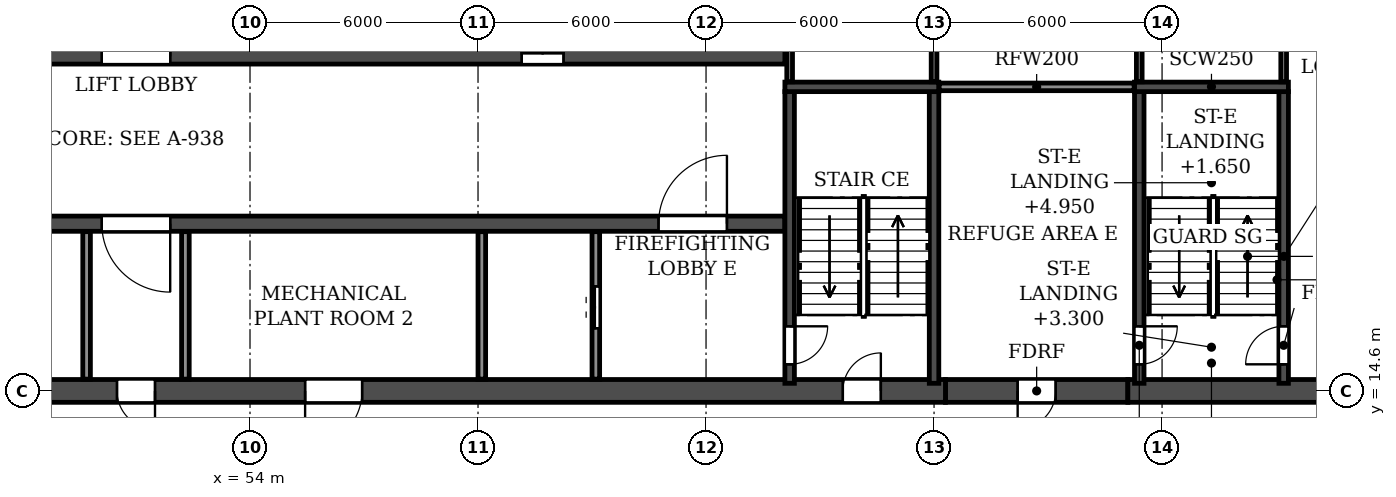
"""IFC4 building model, lengths in metres.
Left out: names, types, materials, properties, quantities, classifications, styles, units other than length and angle.
Written with IfcOpenShell. Run it as: python <this file> out.ifc"""

import sys

from ifc_helpers import new_model, si_unit, direction, frame, frame_2d, origin, place, context, subcontext, project, spatial, rectangle, extrude, element, fill, save


model = new_model("IFC4")
c1 = context("Model", 3, precision=1e-05, world=origin(), true_north=direction((0.0, 1.0)))
c2 = subcontext(c1, "Body", "Model", "MODEL_VIEW")
j1 = project(units=[si_unit("LENGTHUNIT", "METRE"), si_unit("PLANEANGLEUNIT", "RADIAN")], contexts=[c1])
p1 = place(None, origin())
s1 = spatial("IfcSite", under=j1, at=p1, CompositionType="ELEMENT")
p2 = place(p1, origin())
s2 = spatial("IfcBuilding", under=s1, at=p2, CompositionType="ELEMENT")
p3 = place(p2, frame((0.0, 0.0, 214.8)))
s3 = spatial("IfcBuildingStorey", under=s2, at=p3, CompositionType="ELEMENT", Elevation=214.8)
p4 = place(p3, frame((72.3, 14.6, 0.0), z_axis=(0.0, 0.0, 1.0), x_axis=(1.0, 0.0, 0.0)))
e1 = element("IfcWall", 1, at=p4, inside=s3, PredefinedType="SHEAR", context=c2, shape_type="SweptSolid", body=[
    extrude(rectangle(XDim=4.8, YDim=0.6, at=frame_2d((2.4, 0.0))), origin(), (0.0, 0.0, 1.0), 6.38),
])
p5 = place(p4, frame((1.9, 0.0, 0.0)))
e2 = element("IfcOpeningElement", 2, at=p5, cuts=e1, PredefinedType="OPENING", context=c2, shape_type="SweptSolid", body=[
    extrude(rectangle(XDim=1.0, YDim=2.1, at=frame_2d((0.5, 1.05))), frame((0.0, 0.31, 0.0), z_axis=(0.0, -1.0, 0.0), x_axis=(1.0, 0.0, 0.0)), (0.0, 0.0, 1.0), 0.62),
])
p6 = place(p3, frame((29.7, 14.6, 0.0), z_axis=(0.0, 0.0, 1.0), x_axis=(1.0, 0.0, 0.0)))
e3 = element("IfcWall", 3, at=p6, inside=s3, PredefinedType="SOLIDWALL", context=c2, shape_type="SweptSolid", body=[
    extrude(rectangle(XDim=42.6, YDim=0.6, at=frame_2d((21.3, 0.0))), origin(), (0.0, 0.0, 1.0), 6.38),
])
p7 = place(p6, frame((1.7, 0.0, 0.0)))
e4 = element("IfcOpeningElement", 4, at=p7, cuts=e3, PredefinedType="OPENING", context=c2, shape_type="SweptSolid", body=[
    extrude(rectangle(XDim=1.0, YDim=2.1, at=frame_2d((0.5, 1.05))), frame((0.0, 0.31, 0.0), z_axis=(0.0, -1.0, 0.0), x_axis=(1.0, 0.0, 0.0)), (0.0, 0.0, 1.0), 0.62),
])
p8 = place(p6, frame((15.6, 0.0, 0.0)))
e5 = element("IfcOpeningElement", 5, at=p8, cuts=e3, PredefinedType="OPENING", context=c2, shape_type="SweptSolid", body=[
    extrude(rectangle(XDim=1.0, YDim=2.1, at=frame_2d((0.5, 1.05))), frame((0.0, 0.31, 0.0), z_axis=(0.0, -1.0, 0.0), x_axis=(1.0, 0.0, 0.0)), (0.0, 0.0, 1.0), 0.62),
])
p9 = place(p6, frame((20.8, 0.0, 0.0)))
e6 = element("IfcOpeningElement", 6, at=p9, cuts=e3, PredefinedType="OPENING", context=c2, shape_type="SweptSolid", body=[
    extrude(rectangle(XDim=1.0, YDim=2.1, at=frame_2d((0.5, 1.05))), frame((0.0, 0.31, 0.0), z_axis=(0.0, -1.0, 0.0), x_axis=(1.0, 0.0, 0.0)), (0.0, 0.0, 1.0), 0.62),
])
p10 = place(p6, frame((25.75, 0.0, 0.0)))
e7 = element("IfcOpeningElement", 7, at=p10, cuts=e3, PredefinedType="OPENING", context=c2, shape_type="SweptSolid", body=[
    extrude(rectangle(XDim=1.5, YDim=2.1, at=frame_2d((0.75, 1.05))), frame((0.0, 0.31, 0.0), z_axis=(0.0, -1.0, 0.0), x_axis=(1.0, 0.0, 0.0)), (0.0, 0.0, 1.0), 0.62),
])
p11 = place(p6, frame((39.9, 0.0, 0.0)))
e8 = element("IfcOpeningElement", 8, at=p11, cuts=e3, PredefinedType="OPENING", context=c2, shape_type="SweptSolid", body=[
    extrude(rectangle(XDim=1.0, YDim=2.1, at=frame_2d((0.5, 1.05))), frame((0.0, 0.31, 0.0), z_axis=(0.0, -1.0, 0.0), x_axis=(1.0, 0.0, 0.0)), (0.0, 0.0, 1.0), 0.62),
])
p12 = place(p3, frame((77.1, 14.6, 0.0), z_axis=(0.0, 0.0, 1.0), x_axis=(1.0, 0.0, 0.0)))
e9 = element("IfcWall", 9, at=p12, inside=s3, PredefinedType="SOLIDWALL", context=c2, shape_type="SweptSolid", body=[
    extrude(rectangle(XDim=6.7, YDim=0.6, at=frame_2d((3.35, 0.0))), origin(), (0.0, 0.0, 1.0), 6.38),
])
p13 = place(p12, frame((5.0, 0.0, 0.0)))
e10 = element("IfcOpeningElement", 10, at=p13, cuts=e9, PredefinedType="OPENING", context=c2, shape_type="SweptSolid", body=[
    extrude(rectangle(XDim=1.0, YDim=2.1, at=frame_2d((0.5, 1.05))), frame((0.0, 0.31, 0.0), z_axis=(0.0, -1.0, 0.0), x_axis=(1.0, 0.0, 0.0)), (0.0, 0.0, 1.0), 0.62),
])
p14 = place(p3, frame((33.925, 19.0, 0.0), z_axis=(0.0, 0.0, 1.0), x_axis=(1.0, 0.0, 0.0)))
e11 = element("IfcWall", 11, at=p14, inside=s3, PredefinedType="SOLIDWALL", context=c2, shape_type="SweptSolid", body=[
    extrude(rectangle(XDim=34.15, YDim=0.4, at=frame_2d((17.075, 0.0))), origin(), (0.0, 0.0, 1.0), 6.38),
])
p15 = place(p14, frame((16.175, 0.0, 0.0)))
e12 = element("IfcOpeningElement", 12, at=p15, cuts=e11, PredefinedType="OPENING", context=c2, shape_type="SweptSolid", body=[
    extrude(rectangle(XDim=1.8, YDim=2.1, at=frame_2d((0.9, 1.05))), frame((0.0, 0.21, 0.0), z_axis=(0.0, -1.0, 0.0), x_axis=(1.0, 0.0, 0.0)), (0.0, 0.0, 1.0), 0.42),
])
p16 = place(p14, frame((1.525, 0.0, 0.0)))
e13 = element("IfcOpeningElement", 13, at=p16, cuts=e11, PredefinedType="OPENING", context=c2, shape_type="SweptSolid", body=[
    extrude(rectangle(XDim=1.8, YDim=2.1, at=frame_2d((0.9, 1.05))), frame((0.0, 0.21, 0.0), z_axis=(0.0, -1.0, 0.0), x_axis=(1.0, 0.0, 0.0)), (0.0, 0.0, 1.0), 0.42),
])
p17 = place(p14, frame((30.825, 0.0, 0.0)))
e14 = element("IfcOpeningElement", 14, at=p17, cuts=e11, PredefinedType="OPENING", context=c2, shape_type="SweptSolid", body=[
    extrude(rectangle(XDim=1.8, YDim=2.1, at=frame_2d((0.9, 1.05))), frame((0.0, 0.21, 0.0), z_axis=(0.0, -1.0, 0.0), x_axis=(1.0, 0.0, 0.0)), (0.0, 0.0, 1.0), 0.42),
])
p18 = place(p3, frame((33.925, 23.4, 0.0), z_axis=(0.0, 0.0, 1.0), x_axis=(1.0, 0.0, 0.0)))
e15 = element("IfcWall", 15, at=p18, inside=s3, PredefinedType="SOLIDWALL", context=c2, shape_type="SweptSolid", body=[
    extrude(rectangle(XDim=34.15, YDim=0.4, at=frame_2d((17.075, 0.0))), origin(), (0.0, 0.0, 1.0), 6.38),
])
p19 = place(p18, frame((16.175, 0.0, 0.0)))
e16 = element("IfcOpeningElement", 16, at=p19, cuts=e15, PredefinedType="OPENING", context=c2, shape_type="SweptSolid", body=[
    extrude(rectangle(XDim=1.8, YDim=2.1, at=frame_2d((0.9, 1.05))), frame((0.0, 0.21, 0.0), z_axis=(0.0, -1.0, 0.0), x_axis=(1.0, 0.0, 0.0)), (0.0, 0.0, 1.0), 0.42),
])
p20 = place(p18, frame((0.625, 0.0, 0.0)))
e17 = element("IfcOpeningElement", 17, at=p20, cuts=e15, PredefinedType="OPENING", context=c2, shape_type="SweptSolid", body=[
    extrude(rectangle(XDim=1.1, YDim=2.1, at=frame_2d((0.55, 1.05))), frame((0.0, 0.21, 0.0), z_axis=(0.0, -1.0, 0.0), x_axis=(1.0, 0.0, 0.0)), (0.0, 0.0, 1.0), 0.42),
])
p21 = place(p18, frame((3.225, 0.0, 0.0)))
e18 = element("IfcOpeningElement", 18, at=p21, cuts=e15, PredefinedType="OPENING", context=c2, shape_type="SweptSolid", body=[
    extrude(rectangle(XDim=1.1, YDim=2.1, at=frame_2d((0.55, 1.05))), frame((0.0, 0.21, 0.0), z_axis=(0.0, -1.0, 0.0), x_axis=(1.0, 0.0, 0.0)), (0.0, 0.0, 1.0), 0.42),
])
p22 = place(p18, frame((5.825, 0.0, 0.0)))
e19 = element("IfcOpeningElement", 19, at=p22, cuts=e15, PredefinedType="OPENING", context=c2, shape_type="SweptSolid", body=[
    extrude(rectangle(XDim=1.1, YDim=2.1, at=frame_2d((0.55, 1.05))), frame((0.0, 0.21, 0.0), z_axis=(0.0, -1.0, 0.0), x_axis=(1.0, 0.0, 0.0)), (0.0, 0.0, 1.0), 0.42),
])
p23 = place(p18, frame((8.425, 0.0, 0.0)))
e20 = element("IfcOpeningElement", 20, at=p23, cuts=e15, PredefinedType="OPENING", context=c2, shape_type="SweptSolid", body=[
    extrude(rectangle(XDim=1.1, YDim=2.1, at=frame_2d((0.55, 1.05))), frame((0.0, 0.21, 0.0), z_axis=(0.0, -1.0, 0.0), x_axis=(1.0, 0.0, 0.0)), (0.0, 0.0, 1.0), 0.42),
])
p24 = place(p18, frame((11.025, 0.0, 0.0)))
e21 = element("IfcOpeningElement", 21, at=p24, cuts=e15, PredefinedType="OPENING", context=c2, shape_type="SweptSolid", body=[
    extrude(rectangle(XDim=1.1, YDim=2.1, at=frame_2d((0.55, 1.05))), frame((0.0, 0.21, 0.0), z_axis=(0.0, -1.0, 0.0), x_axis=(1.0, 0.0, 0.0)), (0.0, 0.0, 1.0), 0.42),
])
p25 = place(p18, frame((13.625, 0.0, 0.0)))
e22 = element("IfcOpeningElement", 22, at=p25, cuts=e15, PredefinedType="OPENING", context=c2, shape_type="SweptSolid", body=[
    extrude(rectangle(XDim=1.1, YDim=2.1, at=frame_2d((0.55, 1.05))), frame((0.0, 0.21, 0.0), z_axis=(0.0, -1.0, 0.0), x_axis=(1.0, 0.0, 0.0)), (0.0, 0.0, 1.0), 0.42),
])
p26 = place(p18, frame((27.225, 0.0, 0.0)))
e23 = element("IfcOpeningElement", 23, at=p26, cuts=e15, PredefinedType="OPENING", context=c2, shape_type="SweptSolid", body=[
    extrude(rectangle(XDim=1.1, YDim=2.1, at=frame_2d((0.55, 1.05))), frame((0.0, 0.21, 0.0), z_axis=(0.0, -1.0, 0.0), x_axis=(1.0, 0.0, 0.0)), (0.0, 0.0, 1.0), 0.42),
])
p27 = place(p3, frame((68.2, 14.8, 0.0), z_axis=(0.0, 0.0, 1.0), x_axis=(0.0, 1.0, 0.0)))
e24 = element("IfcWall", 24, at=p27, inside=s3, PredefinedType="SOLIDWALL", context=c2, shape_type="SweptSolid", body=[
    extrude(rectangle(XDim=7.675, YDim=0.25, at=frame_2d((3.837, 0.0))), origin(), (0.0, 0.0, 1.0), 6.38),
])
p28 = place(p27, frame((0.5, 0.0, 0.0)))
e25 = element("IfcOpeningElement", 25, at=p28, cuts=e24, PredefinedType="OPENING", context=c2, shape_type="SweptSolid", body=[
    extrude(rectangle(XDim=1.0, YDim=2.1, at=frame_2d((0.5, 1.05))), frame((0.0, 0.135, 0.0), z_axis=(0.0, -1.0, 0.0), x_axis=(1.0, 0.0, 0.0)), (0.0, 0.0, 1.0), 0.27),
])
p29 = place(p3, frame((72.0, 14.8, 0.0), z_axis=(0.0, 0.0, 1.0), x_axis=(0.0, 1.0, 0.0)))
e26 = element("IfcWall", 26, at=p29, inside=s3, PredefinedType="SOLIDWALL", context=c2, shape_type="SweptSolid", body=[
    extrude(rectangle(XDim=7.675, YDim=0.25, at=frame_2d((3.837, 0.0))), origin(), (0.0, 0.0, 1.0), 6.38),
])
p30 = place(p3, frame((68.075, 22.6, 0.0), z_axis=(0.0, 0.0, 1.0), x_axis=(1.0, 0.0, 0.0)))
e27 = element("IfcWall", 27, at=p30, inside=s3, PredefinedType="SOLIDWALL", context=c2, shape_type="SweptSolid", body=[
    extrude(rectangle(XDim=4.05, YDim=0.25, at=frame_2d((2.025, 0.0))), origin(), (0.0, 0.0, 1.0), 6.38),
])
p31 = place(p3, frame((77.4, 14.8, 0.0), z_axis=(0.0, 0.0, 1.0), x_axis=(0.0, 1.0, 0.0)))
e28 = element("IfcWall", 28, at=p31, inside=s3, PredefinedType="SOLIDWALL", context=c2, shape_type="SweptSolid", body=[
    extrude(rectangle(XDim=7.675, YDim=0.25, at=frame_2d((3.837, 0.0))), origin(), (0.0, 0.0, 1.0), 6.38),
])
p32 = place(p31, frame((0.5, 0.0, 0.0)))
e29 = element("IfcOpeningElement", 29, at=p32, cuts=e28, PredefinedType="OPENING", context=c2, shape_type="SweptSolid", body=[
    extrude(rectangle(XDim=1.0, YDim=2.1, at=frame_2d((0.5, 1.05))), frame((0.0, 0.135, 0.0), z_axis=(0.0, -1.0, 0.0), x_axis=(1.0, 0.0, 0.0)), (0.0, 0.0, 1.0), 0.27),
])
p33 = place(p3, frame((81.2, 14.8, 0.0), z_axis=(0.0, 0.0, 1.0), x_axis=(0.0, 1.0, 0.0)))
e30 = element("IfcWall", 30, at=p33, inside=s3, PredefinedType="SOLIDWALL", context=c2, shape_type="SweptSolid", body=[
    extrude(rectangle(XDim=7.675, YDim=0.25, at=frame_2d((3.837, 0.0))), origin(), (0.0, 0.0, 1.0), 6.38),
])
p34 = place(p33, frame((0.5, 0.0, 0.0)))
e31 = element("IfcOpeningElement", 31, at=p34, cuts=e30, PredefinedType="OPENING", context=c2, shape_type="SweptSolid", body=[
    extrude(rectangle(XDim=1.0, YDim=2.1, at=frame_2d((0.5, 1.05))), frame((0.0, 0.135, 0.0), z_axis=(0.0, -1.0, 0.0), x_axis=(1.0, 0.0, 0.0)), (0.0, 0.0, 1.0), 0.27),
])
p35 = place(p3, frame((77.275, 22.6, 0.0), z_axis=(0.0, 0.0, 1.0), x_axis=(1.0, 0.0, 0.0)))
e32 = element("IfcWall", 32, at=p35, inside=s3, PredefinedType="SOLIDWALL", context=c2, shape_type="SweptSolid", body=[
    extrude(rectangle(XDim=4.05, YDim=0.25, at=frame_2d((2.025, 0.0))), origin(), (0.0, 0.0, 1.0), 6.38),
])
for number, where, z_axis, x_axis in (
    (33, (49.7, 14.91, 0.0), (0.0, 0.0, 1.0), (0.0, 1.0, 0.0)),
    (34, (52.3, 14.91, 0.0), (0.0, 0.0, 1.0), (0.0, 1.0, 0.0)),
):
    element("IfcWall", number, at=place(p3, frame(where, z_axis=z_axis, x_axis=x_axis)), inside=s3, PredefinedType="PARTITIONING", context=c2, shape_type="SweptSolid", body=[
        extrude(rectangle(XDim=3.88, YDim=0.2, at=frame_2d((1.94, 0.0))), origin(), (0.0, 0.0, 1.0), 6.38),
    ])
p36 = place(p3, frame((72.135, 22.6, 0.0), z_axis=(0.0, 0.0, 1.0), x_axis=(1.0, 0.0, 0.0)))
e35 = element("IfcWall", 35, at=p36, inside=s3, PredefinedType="PARTITIONING", context=c2, shape_type="SweptSolid", body=[
    extrude(rectangle(XDim=5.13, YDim=0.2, at=frame_2d((2.565, 0.0))), origin(), (0.0, 0.0, 1.0), 6.38),
])
for number, where, z_axis, x_axis in (
    (36, (68.2, 22.735, 0.0), (0.0, 0.0, 1.0), (0.0, 1.0, 0.0)),
    (37, (72.0, 22.735, 0.0), (0.0, 0.0, 1.0), (0.0, 1.0, 0.0)),
    (38, (77.4, 22.735, 0.0), (0.0, 0.0, 1.0), (0.0, 1.0, 0.0)),
    (39, (81.2, 22.735, 0.0), (0.0, 0.0, 1.0), (0.0, 1.0, 0.0)),
):
    element("IfcWall", number, at=place(p3, frame(where, z_axis=z_axis, x_axis=x_axis)), inside=s3, PredefinedType="PARTITIONING", context=c2, shape_type="SweptSolid", body=[
        extrude(rectangle(XDim=4.755, YDim=0.15, at=frame_2d((2.377, 0.0))), origin(), (0.0, 0.0, 1.0), 6.38),
    ])
p37 = place(p3, frame((60.1, 14.91, 0.0), z_axis=(0.0, 0.0, 1.0), x_axis=(0.0, 1.0, 0.0)))
e40 = element("IfcWall", 40, at=p37, inside=s3, PredefinedType="PARTITIONING", context=c2, shape_type="SweptSolid", body=[
    extrude(rectangle(XDim=3.88, YDim=0.2, at=frame_2d((1.94, 0.0))), origin(), (0.0, 0.0, 1.0), 6.38),
])
p38 = place(p3, frame((63.1, 14.91, 0.0), z_axis=(0.0, 0.0, 1.0), x_axis=(0.0, 1.0, 0.0)))
e41 = element("IfcWall", 41, at=p38, inside=s3, PredefinedType="PARTITIONING", context=c2, shape_type="SweptSolid", body=[
    extrude(rectangle(XDim=3.88, YDim=0.2, at=frame_2d((1.94, 0.0))), origin(), (0.0, 0.0, 1.0), 6.38),
])
p39 = place(p38, frame((1.34, 0.0, 0.0)))
e42 = element("IfcOpeningElement", 42, at=p39, cuts=e41, PredefinedType="OPENING", context=c2, shape_type="SweptSolid", body=[
    extrude(rectangle(XDim=1.1, YDim=2.1, at=frame_2d((0.55, 1.05))), frame((0.0, 0.11, 0.0), z_axis=(0.0, -1.0, 0.0), x_axis=(1.0, 0.0, 0.0)), (0.0, 0.0, 1.0), 0.22),
])
p40 = place(p9, frame((1.0, 0.0, 0.0), z_axis=(0.0, 0.0, 1.0), x_axis=(-1.0, 0.0, 0.0)))
e43 = element("IfcDoor", 43, at=p40, inside=s3, OperationType="SINGLE_SWING_LEFT", PredefinedType="DOOR", context=c2, shape_type="SweptSolid", body=[
    extrude(rectangle(XDim=1.0, YDim=2.1, at=frame_2d((0.5, 1.05))), frame((0.0, 0.025, 0.0), z_axis=(0.0, -1.0, 0.0), x_axis=(1.0, 0.0, 0.0)), (0.0, 0.0, 1.0), 0.05),
])
fill(e6, e43)
p41 = place(p10, frame((1.5, 0.0, 0.0), z_axis=(0.0, 0.0, 1.0), x_axis=(-1.0, 0.0, 0.0)))
e44 = element("IfcDoor", 44, at=p41, inside=s3, OperationType="DOUBLE_DOOR_SINGLE_SWING", PredefinedType="DOOR", context=c2, shape_type="SweptSolid", body=[
    extrude(rectangle(XDim=1.5, YDim=2.1, at=frame_2d((0.75, 1.05))), frame((0.0, 0.025, 0.0), z_axis=(0.0, -1.0, 0.0), x_axis=(1.0, 0.0, 0.0)), (0.0, 0.0, 1.0), 0.05),
])
fill(e7, e44)
p42 = place(p11, origin())
e45 = element("IfcDoor", 45, at=p42, inside=s3, OperationType="SINGLE_SWING_RIGHT", PredefinedType="DOOR", context=c2, shape_type="SweptSolid", body=[
    extrude(rectangle(XDim=1.0, YDim=2.1, at=frame_2d((0.5, 1.05))), frame((0.0, 0.025, 0.0), z_axis=(0.0, -1.0, 0.0), x_axis=(1.0, 0.0, 0.0)), (0.0, 0.0, 1.0), 0.05),
])
fill(e8, e45)
p43 = place(p5, frame((1.0, 0.0, 0.0), z_axis=(0.0, 0.0, 1.0), x_axis=(-1.0, 0.0, 0.0)))
e46 = element("IfcDoor", 46, at=p43, inside=s3, OperationType="SINGLE_SWING_RIGHT", PredefinedType="DOOR", context=c2, shape_type="SweptSolid", body=[
    extrude(rectangle(XDim=1.0, YDim=2.1, at=frame_2d((0.5, 1.05))), frame((0.0, 0.025, 0.0), z_axis=(0.0, -1.0, 0.0), x_axis=(1.0, 0.0, 0.0)), (0.0, 0.0, 1.0), 0.05),
])
fill(e2, e46)
p44 = place(p39, origin())
e47 = element("IfcDoor", 47, at=p44, inside=s3, OperationType="DOUBLE_DOOR_SLIDING", PredefinedType="DOOR", context=c2, shape_type="SweptSolid", body=[
    extrude(rectangle(XDim=1.1, YDim=2.1, at=frame_2d((0.55, 1.05))), frame((0.0, 0.025, 0.0), z_axis=(0.0, -1.0, 0.0), x_axis=(1.0, 0.0, 0.0)), (0.0, 0.0, 1.0), 0.05),
])
fill(e42, e47)
p45 = place(p28, frame((1.0, 0.0, 0.0), z_axis=(0.0, 0.0, 1.0), x_axis=(-1.0, 0.0, 0.0)))
e48 = element("IfcDoor", 48, at=p45, inside=s3, OperationType="SINGLE_SWING_LEFT", PredefinedType="DOOR", context=c2, shape_type="SweptSolid", body=[
    extrude(rectangle(XDim=1.0, YDim=2.1, at=frame_2d((0.5, 1.05))), frame((0.0, 0.025, 0.0), z_axis=(0.0, -1.0, 0.0), x_axis=(1.0, 0.0, 0.0)), (0.0, 0.0, 1.0), 0.05),
])
fill(e25, e48)
p46 = place(p19, origin())
e49 = element("IfcDoor", 49, at=p46, inside=s3, OperationType="DOUBLE_DOOR_SINGLE_SWING", PredefinedType="DOOR", context=c2, shape_type="SweptSolid", body=[
    extrude(rectangle(XDim=1.8, YDim=2.1, at=frame_2d((0.9, 1.05))), frame((0.0, 0.025, 0.0), z_axis=(0.0, -1.0, 0.0), x_axis=(1.0, 0.0, 0.0)), (0.0, 0.0, 1.0), 0.05),
])
fill(e16, e49)
p47 = place(p15, frame((1.8, 0.0, 0.0), z_axis=(0.0, 0.0, 1.0), x_axis=(-1.0, 0.0, 0.0)))
e50 = element("IfcDoor", 50, at=p47, inside=s3, OperationType="DOUBLE_DOOR_SINGLE_SWING", PredefinedType="DOOR", context=c2, shape_type="SweptSolid", body=[
    extrude(rectangle(XDim=1.8, YDim=2.1, at=frame_2d((0.9, 1.05))), frame((0.0, 0.025, 0.0), z_axis=(0.0, -1.0, 0.0), x_axis=(1.0, 0.0, 0.0)), (0.0, 0.0, 1.0), 0.05),
])
fill(e12, e50)
p48 = place(p26, origin())
e51 = element("IfcDoor", 51, at=p48, inside=s3, OperationType="DOUBLE_DOOR_SLIDING", PredefinedType="DOOR", context=c2, shape_type="SweptSolid", body=[
    extrude(rectangle(XDim=1.1, YDim=2.1, at=frame_2d((0.55, 1.05))), frame((0.0, 0.025, 0.0), z_axis=(0.0, -1.0, 0.0), x_axis=(1.0, 0.0, 0.0)), (0.0, 0.0, 1.0), 0.05),
])
fill(e23, e51)
p49 = place(p17, origin())
e52 = element("IfcDoor", 52, at=p49, inside=s3, OperationType="DOUBLE_DOOR_SINGLE_SWING", PredefinedType="DOOR", context=c2, shape_type="SweptSolid", body=[
    extrude(rectangle(XDim=1.8, YDim=2.1, at=frame_2d((0.9, 1.05))), frame((0.0, 0.025, 0.0), z_axis=(0.0, -1.0, 0.0), x_axis=(1.0, 0.0, 0.0)), (0.0, 0.0, 1.0), 0.05),
])
fill(e14, e52)
p50 = place(p32, frame((1.0, 0.0, 0.0), z_axis=(0.0, 0.0, 1.0), x_axis=(-1.0, 0.0, 0.0)))
e53 = element("IfcDoor", 53, at=p50, inside=s3, OperationType="SINGLE_SWING_LEFT", PredefinedType="DOOR", context=c2, shape_type="SweptSolid", body=[
    extrude(rectangle(XDim=1.0, YDim=2.1, at=frame_2d((0.5, 1.05))), frame((0.0, 0.025, 0.0), z_axis=(0.0, -1.0, 0.0), x_axis=(1.0, 0.0, 0.0)), (0.0, 0.0, 1.0), 0.05),
])
fill(e29, e53)
p51 = place(p34, origin())
e54 = element("IfcDoor", 54, at=p51, inside=s3, OperationType="SINGLE_SWING_LEFT", PredefinedType="DOOR", context=c2, shape_type="SweptSolid", body=[
    extrude(rectangle(XDim=1.0, YDim=2.1, at=frame_2d((0.5, 1.05))), frame((0.0, 0.025, 0.0), z_axis=(0.0, -1.0, 0.0), x_axis=(1.0, 0.0, 0.0)), (0.0, 0.0, 1.0), 0.05),
])
fill(e31, e54)
save(model, sys.argv[1])
